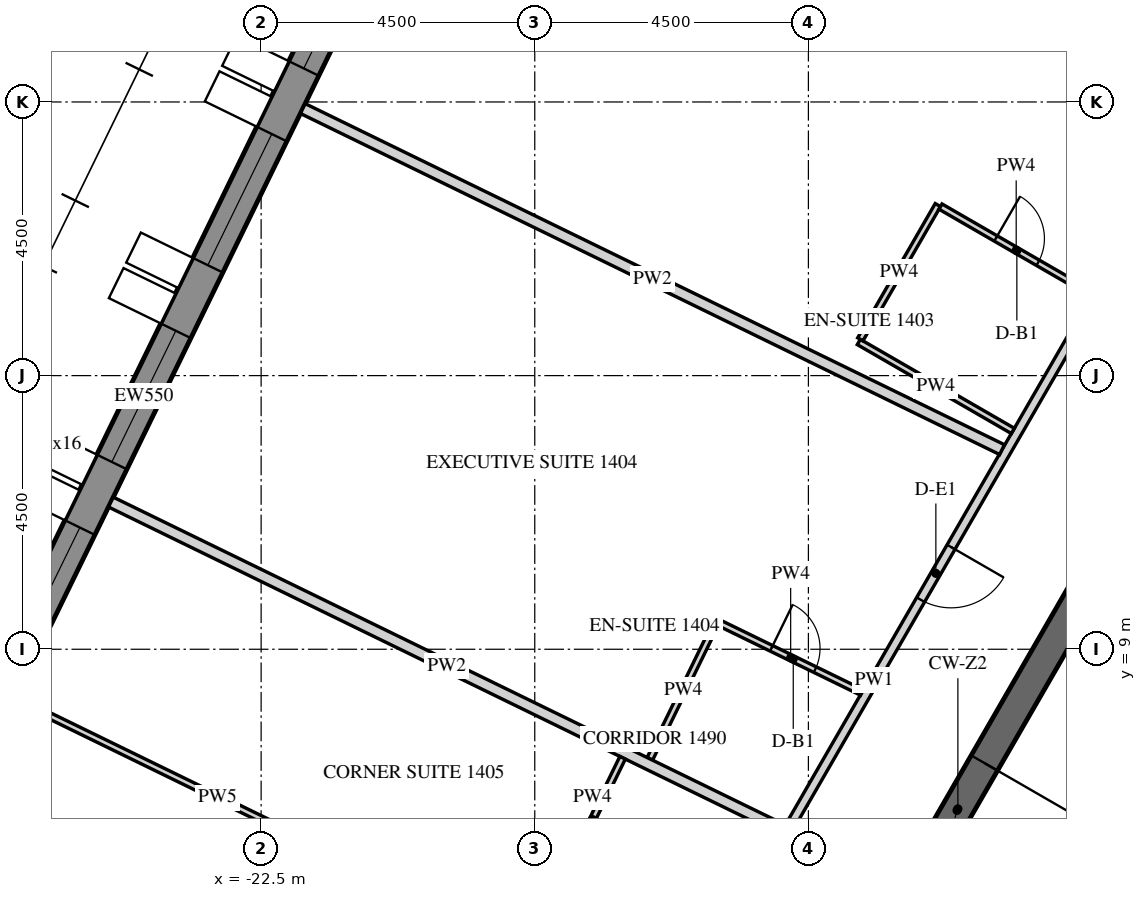
"""IFC4 building model, lengths in metres.
Left out: names, types, materials, properties, quantities, classifications, styles, units other than length and angle.
Written with IfcOpenShell. Run it as: python <this file> out.ifc"""

import sys

from ifc_helpers import new_model, si_unit, direction, frame, frame_2d, origin, place, context, subcontext, project, spatial, polyline, rectangle, outline, extrude, element, fill, save


model = new_model("IFC4")
c1 = context("Model", 3, precision=1e-05, world=origin(), true_north=direction((0.0, 1.0)))
c2 = subcontext(c1, "Body", "Model", "MODEL_VIEW")
j1 = project(units=[si_unit("LENGTHUNIT", "METRE"), si_unit("PLANEANGLEUNIT", "RADIAN")], contexts=[c1])
p1 = place(None, origin())
s1 = spatial("IfcSite", under=j1, at=p1, CompositionType="ELEMENT")
p2 = place(p1, origin())
s2 = spatial("IfcBuilding", under=s1, at=p2, CompositionType="ELEMENT")
p3 = place(p2, frame((0.0, 0.0, 183.9)))
s3 = spatial("IfcBuildingStorey", under=s2, at=p3, CompositionType="ELEMENT", Elevation=183.9)
p4 = place(p3, frame((-18.345, 25.633, -0.15), z_axis=(0.0, 0.0, 1.0), x_axis=(-0.43837181828, -0.898793718791, 0.0)))
e1 = element("IfcWall", 1, at=p4, inside=s3, PredefinedType="SOLIDWALL", context=c2, shape_type="SweptSolid", body=[
    extrude(outline(polyline([(-0.026, -0.275), (27.78, -0.275), (27.735, 0.275), (0.026, 0.275), (-0.026, -0.275)])), origin(), (0.0, 0.0, 1.0), 3.9),
])
p5 = place(p4, frame((1.879, 0.0, 1.05)))
e2 = element("IfcOpeningElement", 2, at=p5, cuts=e1, PredefinedType="OPENING", context=c2, shape_type="SweptSolid", body=[
    extrude(rectangle(XDim=2.4, YDim=2.4, at=frame_2d((1.2, 1.2))), frame((0.0, 0.285, 0.0), z_axis=(0.0, -1.0, 0.0), x_axis=(1.0, 0.0, 0.0)), (0.0, 0.0, 1.0), 0.57),
])
p6 = place(p4, frame((5.479, 0.0, 1.05)))
e3 = element("IfcOpeningElement", 3, at=p6, cuts=e1, PredefinedType="OPENING", context=c2, shape_type="SweptSolid", body=[
    extrude(rectangle(XDim=2.4, YDim=2.4, at=frame_2d((1.2, 1.2))), frame((0.0, 0.285, 0.0), z_axis=(0.0, -1.0, 0.0), x_axis=(1.0, 0.0, 0.0)), (0.0, 0.0, 1.0), 0.57),
])
p7 = place(p4, frame((9.079, 0.0, 1.05)))
e4 = element("IfcOpeningElement", 4, at=p7, cuts=e1, PredefinedType="OPENING", context=c2, shape_type="SweptSolid", body=[
    extrude(rectangle(XDim=2.4, YDim=2.4, at=frame_2d((1.2, 1.2))), frame((0.0, 0.285, 0.0), z_axis=(0.0, -1.0, 0.0), x_axis=(1.0, 0.0, 0.0)), (0.0, 0.0, 1.0), 0.57),
])
p8 = place(p4, frame((12.679, 0.0, 1.05)))
e5 = element("IfcOpeningElement", 5, at=p8, cuts=e1, PredefinedType="OPENING", context=c2, shape_type="SweptSolid", body=[
    extrude(rectangle(XDim=2.4, YDim=2.4, at=frame_2d((1.2, 1.2))), frame((0.0, 0.285, 0.0), z_axis=(0.0, -1.0, 0.0), x_axis=(1.0, 0.0, 0.0)), (0.0, 0.0, 1.0), 0.57),
])
p9 = place(p4, frame((16.279, 0.0, 1.05)))
e6 = element("IfcOpeningElement", 6, at=p9, cuts=e1, PredefinedType="OPENING", context=c2, shape_type="SweptSolid", body=[
    extrude(rectangle(XDim=2.4, YDim=2.4, at=frame_2d((1.2, 1.2))), frame((0.0, 0.285, 0.0), z_axis=(0.0, -1.0, 0.0), x_axis=(1.0, 0.0, 0.0)), (0.0, 0.0, 1.0), 0.57),
])
p10 = place(p4, frame((19.879, 0.0, 1.05)))
e7 = element("IfcOpeningElement", 7, at=p10, cuts=e1, PredefinedType="OPENING", context=c2, shape_type="SweptSolid", body=[
    extrude(rectangle(XDim=2.4, YDim=2.4, at=frame_2d((1.2, 1.2))), frame((0.0, 0.285, 0.0), z_axis=(0.0, -1.0, 0.0), x_axis=(1.0, 0.0, 0.0)), (0.0, 0.0, 1.0), 0.57),
])
p11 = place(p4, frame((23.479, 0.0, 1.05)))
e8 = element("IfcOpeningElement", 8, at=p11, cuts=e1, PredefinedType="OPENING", context=c2, shape_type="SweptSolid", body=[
    extrude(rectangle(XDim=2.4, YDim=2.4, at=frame_2d((1.2, 1.2))), frame((0.0, 0.285, 0.0), z_axis=(0.0, -1.0, 0.0), x_axis=(1.0, 0.0, 0.0)), (0.0, 0.0, 1.0), 0.57),
])
p12 = place(p3, frame((-7.361, 12.75, -0.15), z_axis=(0.0, 0.0, 1.0), x_axis=(-0.50000571537, -0.866022103989, 0.0)))
e9 = element("IfcWall", 9, at=p12, inside=s3, PredefinedType="SHEAR", context=c2, shape_type="SweptSolid", body=[
    extrude(outline(polyline([(-0.144, -0.25), (14.867, -0.25), (14.578, 0.25), (0.144, 0.25), (-0.144, -0.25)])), origin(), (0.0, 0.0, 1.0), 3.9),
])
p13 = place(p12, frame((6.49, 0.0, 0.15)))
e10 = element("IfcOpeningElement", 10, at=p13, cuts=e9, PredefinedType="OPENING", context=c2, shape_type="SweptSolid", body=[
    extrude(rectangle(XDim=1.8, YDim=2.4, at=frame_2d((0.9, 1.2))), frame((0.0, 0.26, 0.0), z_axis=(0.0, -1.0, 0.0), x_axis=(1.0, 0.0, 0.0)), (0.0, 0.0, 1.0), 0.52),
])
p14 = place(p3, frame((-5.673, 9.825, -0.15), z_axis=(0.0, 0.0, 1.0), x_axis=(-0.499995046907, -0.866028263435, 0.0)))
e11 = element("IfcWall", 11, at=p14, inside=s3, PredefinedType="SHEAR", context=c2, shape_type="SweptSolid", body=[
    extrude(outline(polyline([(-0.101, -0.175), (11.446, -0.175), (11.244, 0.175), (0.101, 0.175), (-0.101, -0.175)])), origin(), (0.0, 0.0, 1.0), 3.9),
])
p15 = place(p14, frame((4.801, 0.0, 0.15)))
e12 = element("IfcOpeningElement", 12, at=p15, cuts=e11, PredefinedType="OPENING", context=c2, shape_type="SweptSolid", body=[
    extrude(rectangle(XDim=1.8, YDim=2.4, at=frame_2d((0.9, 1.2))), frame((0.0, 0.185, 0.0), z_axis=(0.0, -1.0, 0.0), x_axis=(1.0, 0.0, 0.0)), (0.0, 0.0, 1.0), 0.37),
])
p16 = place(p3, frame((-8.704, 14.925, 0.0), z_axis=(0.0, 0.0, 1.0), x_axis=(-0.499998228944, -0.866026426302, 0.0)))
e13 = element("IfcWall", 13, at=p16, inside=s3, PredefinedType="PARTITIONING", context=c2, shape_type="SweptSolid", body=[
    extrude(rectangle(XDim=14.867, YDim=0.15, at=frame_2d((7.433, 0.0))), origin(), (0.0, 0.0, 1.0), 2.988),
])
p17 = place(p16, frame((4.901, 0.0, 0.0)))
e14 = element("IfcOpeningElement", 14, at=p17, cuts=e13, PredefinedType="OPENING", context=c2, shape_type="SweptSolid", body=[
    extrude(rectangle(XDim=1.0, YDim=2.1, at=frame_2d((0.5, 1.05))), frame((0.0, 0.085, 0.0), z_axis=(0.0, -1.0, 0.0), x_axis=(1.0, 0.0, 0.0)), (0.0, 0.0, 1.0), 0.17),
])
p18 = place(p16, frame((13.284, 0.0, 0.0)))
e15 = element("IfcOpeningElement", 15, at=p18, cuts=e13, PredefinedType="OPENING", context=c2, shape_type="SweptSolid", body=[
    extrude(rectangle(XDim=1.0, YDim=2.1, at=frame_2d((0.5, 1.05))), frame((0.0, 0.085, 0.0), z_axis=(0.0, -1.0, 0.0), x_axis=(1.0, 0.0, 0.0)), (0.0, 0.0, 1.0), 0.17),
])
p19 = place(p3, frame((-10.138, 12.591, 0.0), z_axis=(0.0, 0.0, 1.0), x_axis=(-0.866025730634, 0.499999433879, 0.0)))
e16 = element("IfcWall", 16, at=p19, inside=s3, PredefinedType="PARTITIONING", context=c2, shape_type="SweptSolid", body=[
    extrude(rectangle(XDim=2.925, YDim=0.1, at=frame_2d((1.462, 0.0))), origin(), (0.0, 0.0, 1.0), 2.988),
])
p20 = place(p3, frame((-12.646, 14.096, 0.0), z_axis=(0.0, 0.0, 1.0), x_axis=(0.500020783669, 0.866013403995, 0.0)))
e17 = element("IfcWall", 17, at=p20, inside=s3, PredefinedType="PARTITIONING", context=c2, shape_type="SweptSolid", body=[
    extrude(rectangle(XDim=2.55, YDim=0.1, at=frame_2d((1.275, 0.0))), origin(), (0.0, 0.0, 1.0), 2.988),
])
p21 = place(p3, frame((-11.328, 16.28, 0.0), z_axis=(0.0, 0.0, 1.0), x_axis=(0.865981939951, -0.500075274012, 0.0)))
e18 = element("IfcWall", 18, at=p21, inside=s3, PredefinedType="PARTITIONING", context=c2, shape_type="SweptSolid", body=[
    extrude(rectangle(XDim=2.875, YDim=0.1, at=frame_2d((1.438, 0.0))), origin(), (0.0, 0.0, 1.0), 2.988),
])
p22 = place(p21, frame((1.05, 0.0, 0.0)))
e19 = element("IfcOpeningElement", 19, at=p22, cuts=e18, PredefinedType="OPENING", context=c2, shape_type="SweptSolid", body=[
    extrude(rectangle(XDim=0.8, YDim=2.1, at=frame_2d((0.4, 1.05))), frame((0.0, 0.06, 0.0), z_axis=(0.0, -1.0, 0.0), x_axis=(1.0, 0.0, 0.0)), (0.0, 0.0, 1.0), 0.12),
])
p23 = place(p3, frame((-21.815, 17.892, 0.0), z_axis=(0.0, 0.0, 1.0), x_axis=(0.898799253997, -0.438360469265, 0.0)))
e20 = element("IfcWall", 20, at=p23, inside=s3, PredefinedType="PARTITIONING", context=c2, shape_type="SweptSolid", body=[
    extrude(rectangle(XDim=12.794, YDim=0.18, at=frame_2d((6.397, 0.0))), origin(), (0.0, 0.0, 1.0), 2.988),
])
p24 = place(p3, frame((-16.108, 7.198, 0.0), z_axis=(0.0, 0.0, 1.0), x_axis=(0.438398718232, 0.898780598284, 0.0)))
e21 = element("IfcWall", 21, at=p24, inside=s3, PredefinedType="PARTITIONING", context=c2, shape_type="SweptSolid", body=[
    extrude(rectangle(XDim=2.51, YDim=0.1, at=frame_2d((1.255, 0.0))), origin(), (0.0, 0.0, 1.0), 2.988),
])
p25 = place(p3, frame((-14.962, 9.432, 0.0), z_axis=(0.0, 0.0, 1.0), x_axis=(0.898770247069, -0.438419939081, 0.0)))
e22 = element("IfcWall", 22, at=p25, inside=s3, PredefinedType="PARTITIONING", context=c2, shape_type="SweptSolid", body=[
    extrude(rectangle(XDim=2.605, YDim=0.1, at=frame_2d((1.302, 0.0))), origin(), (0.0, 0.0, 1.0), 2.988),
])
p26 = place(p25, frame((0.95, 0.0, 0.0)))
e23 = element("IfcOpeningElement", 23, at=p26, cuts=e22, PredefinedType="OPENING", context=c2, shape_type="SweptSolid", body=[
    extrude(rectangle(XDim=0.8, YDim=2.1, at=frame_2d((0.4, 1.05))), frame((0.0, 0.06, 0.0), z_axis=(0.0, -1.0, 0.0), x_axis=(1.0, 0.0, 0.0)), (0.0, 0.0, 1.0), 0.12),
])
p27 = place(p3, frame((-24.971, 11.42, 0.0), z_axis=(0.0, 0.0, 1.0), x_axis=(0.898797462081, -0.438364143329, 0.0)))
e24 = element("IfcWall", 24, at=p27, inside=s3, PredefinedType="PARTITIONING", context=c2, shape_type="SweptSolid", body=[
    extrude(rectangle(XDim=12.291, YDim=0.18, at=frame_2d((6.145, 0.0))), origin(), (0.0, 0.0, 1.0), 2.988),
])
p28 = place(p3, frame((-17.546, 5.185, 0.0), z_axis=(0.0, 0.0, 1.0), x_axis=(0.438376807268, 0.898791285477, 0.0)))
e25 = element("IfcWall", 25, at=p28, inside=s3, PredefinedType="PARTITIONING", context=c2, shape_type="SweptSolid", body=[
    extrude(rectangle(XDim=2.26, YDim=0.1, at=frame_2d((1.13, 0.0))), origin(), (0.0, 0.0, 1.0), 2.988),
])
p29 = place(p3, frame((-26.549, 8.185, 0.0), z_axis=(0.0, 0.0, 1.0), x_axis=(0.898794104644, -0.438371027163, 0.0)))
e26 = element("IfcWall", 26, at=p29, inside=s3, PredefinedType="PARTITIONING", context=c2, shape_type="SweptSolid", body=[
    extrude(rectangle(XDim=7.406, YDim=0.1, at=frame_2d((3.703, 0.0))), origin(), (0.0, 0.0, 1.0), 2.988),
])
p30 = place(p6, frame((0.0, 0.205, 0.0)))
e27 = element("IfcWindow", 27, at=p30, inside=s3, PartitioningType="DOUBLE_PANEL_VERTICAL", PredefinedType="WINDOW", context=c2, shape_type="SweptSolid", body=[
    extrude(rectangle(XDim=2.4, YDim=2.4, at=frame_2d((1.2, 1.2))), frame((0.0, 0.03, 0.0), z_axis=(0.0, -1.0, 0.0), x_axis=(1.0, 0.0, 0.0)), (0.0, 0.0, 1.0), 0.06),
])
fill(e3, e27)
p31 = place(p7, frame((0.0, 0.205, 0.0)))
e28 = element("IfcWindow", 28, at=p31, inside=s3, PartitioningType="DOUBLE_PANEL_VERTICAL", PredefinedType="WINDOW", context=c2, shape_type="SweptSolid", body=[
    extrude(rectangle(XDim=2.4, YDim=2.4, at=frame_2d((1.2, 1.2))), frame((0.0, 0.03, 0.0), z_axis=(0.0, -1.0, 0.0), x_axis=(1.0, 0.0, 0.0)), (0.0, 0.0, 1.0), 0.06),
])
fill(e4, e28)
p32 = place(p8, frame((0.0, 0.205, 0.0)))
e29 = element("IfcWindow", 29, at=p32, inside=s3, PartitioningType="DOUBLE_PANEL_VERTICAL", PredefinedType="WINDOW", context=c2, shape_type="SweptSolid", body=[
    extrude(rectangle(XDim=2.4, YDim=2.4, at=frame_2d((1.2, 1.2))), frame((0.0, 0.03, 0.0), z_axis=(0.0, -1.0, 0.0), x_axis=(1.0, 0.0, 0.0)), (0.0, 0.0, 1.0), 0.06),
])
fill(e5, e29)
p33 = place(p9, frame((0.0, 0.205, 0.0)))
e30 = element("IfcWindow", 30, at=p33, inside=s3, PartitioningType="DOUBLE_PANEL_VERTICAL", PredefinedType="WINDOW", context=c2, shape_type="SweptSolid", body=[
    extrude(rectangle(XDim=2.4, YDim=2.4, at=frame_2d((1.2, 1.2))), frame((0.0, 0.03, 0.0), z_axis=(0.0, -1.0, 0.0), x_axis=(1.0, 0.0, 0.0)), (0.0, 0.0, 1.0), 0.06),
])
fill(e6, e30)
p34 = place(p13, origin())
e31 = element("IfcDoor", 31, at=p34, inside=s3, OperationType="DOUBLE_DOOR_SINGLE_SWING", PredefinedType="DOOR", context=c2, shape_type="SweptSolid", body=[
    extrude(rectangle(XDim=1.8, YDim=2.4, at=frame_2d((0.9, 1.2))), frame((0.0, 0.025, 0.0), z_axis=(0.0, -1.0, 0.0), x_axis=(1.0, 0.0, 0.0)), (0.0, 0.0, 1.0), 0.05),
])
fill(e10, e31)
p35 = place(p22, origin())
e32 = element("IfcDoor", 32, at=p35, inside=s3, OperationType="SINGLE_SWING_LEFT", PredefinedType="DOOR", context=c2, shape_type="SweptSolid", body=[
    extrude(rectangle(XDim=0.8, YDim=2.1, at=frame_2d((0.4, 1.05))), frame((0.0, 0.025, 0.0), z_axis=(0.0, -1.0, 0.0), x_axis=(1.0, 0.0, 0.0)), (0.0, 0.0, 1.0), 0.05),
])
fill(e19, e32)
p36 = place(p17, origin())
e33 = element("IfcDoor", 33, at=p36, inside=s3, OperationType="SINGLE_SWING_RIGHT", PredefinedType="DOOR", context=c2, shape_type="SweptSolid", body=[
    extrude(rectangle(XDim=1.0, YDim=2.1, at=frame_2d((0.5, 1.05))), frame((0.0, 0.025, 0.0), z_axis=(0.0, -1.0, 0.0), x_axis=(1.0, 0.0, 0.0)), (0.0, 0.0, 1.0), 0.05),
])
fill(e14, e33)
p37 = place(p26, origin())
e34 = element("IfcDoor", 34, at=p37, inside=s3, OperationType="SINGLE_SWING_LEFT", PredefinedType="DOOR", context=c2, shape_type="SweptSolid", body=[
    extrude(rectangle(XDim=0.8, YDim=2.1, at=frame_2d((0.4, 1.05))), frame((0.0, 0.025, 0.0), z_axis=(0.0, -1.0, 0.0), x_axis=(1.0, 0.0, 0.0)), (0.0, 0.0, 1.0), 0.05),
])
fill(e23, e34)
save(model, sys.argv[1])
